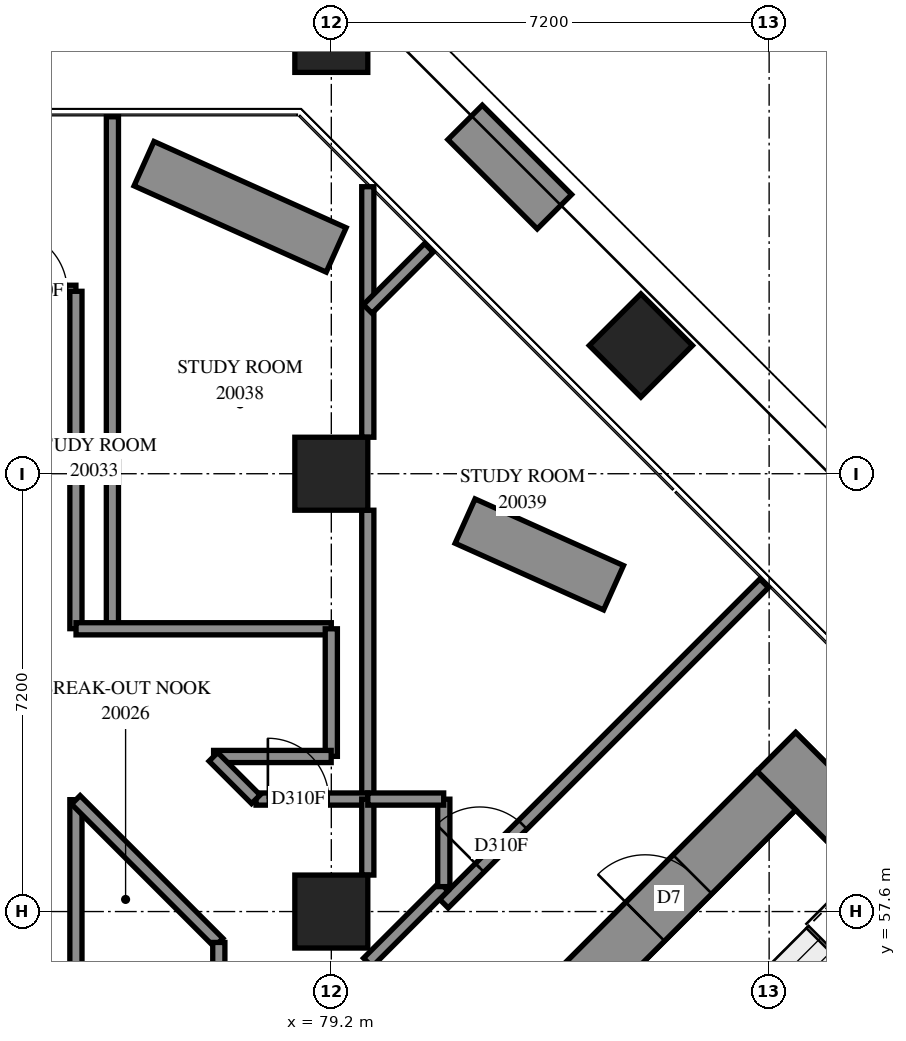
"""IFC4 building model, lengths in metres.
Left out: names, types, materials, properties, quantities, classifications, styles, units other than length and angle.
Written with IfcOpenShell. Run it as: python <this file> out.ifc"""

import sys

from ifc_helpers import new_model, si_unit, direction, frame, frame_2d, origin, origin_2d, place, context, subcontext, project, spatial, rectangle, extrude, element, fill, save


model = new_model("IFC4")
c1 = context("Model", 3, precision=1e-05, world=origin(), true_north=direction((0.0, 1.0)))
c2 = subcontext(c1, "Body", "Model", "MODEL_VIEW")
j1 = project(units=[si_unit("LENGTHUNIT", "METRE"), si_unit("PLANEANGLEUNIT", "RADIAN")], contexts=[c1])
p1 = place(None, origin())
s1 = spatial("IfcSite", under=j1, at=p1, CompositionType="ELEMENT")
p2 = place(p1, origin())
s2 = spatial("IfcBuilding", under=s1, at=p2, CompositionType="ELEMENT")
p3 = place(p2, frame((0.0, 0.0, 77.0)))
s3 = spatial("IfcBuildingStorey", under=s2, at=p3, CompositionType="ELEMENT", Elevation=77.0)
for number, where, z_axis, x_axis in (
    (1, (79.2, 57.6, 0.0), (0.0, 0.0, 1.0), (1.0, 0.0, 0.0)),
    (2, (79.2, 64.8, 0.0), (0.0, 0.0, 1.0), (1.0, 0.0, 0.0)),
    (3, (79.2, 72.0, 0.0), (0.0, 0.0, 1.0), (1.0, 0.0, 0.0)),
    (4, (84.291, 66.909, 0.0), (0.0, 0.0, 1.0), (0.707, -0.707, 0.0)),
):
    element("IfcColumn", number, at=place(p3, frame(where, z_axis=z_axis, x_axis=x_axis)), inside=s3, PredefinedType="COLUMN", context=c2, shape_type="SweptSolid", body=[
        extrude(rectangle(XDim=1.2, YDim=1.2, at=origin_2d()), origin(), (0.0, 0.0, 1.0), 3.9),
    ])
p4 = place(p3, frame((86.519, 60.227, -0.3), z_axis=(0.0, 0.0, 1.0), x_axis=(0.7071036948, -0.7071098676, 0.0)))
e5 = element("IfcWall", 5, at=p4, inside=s3, PredefinedType="SHEAR", context=c2, shape_type="SweptSolid", body=[
    extrude(rectangle(XDim=16.2, YDim=0.9, at=frame_2d((8.1, 0.0))), origin(), (0.0, 0.0, 1.0), 3.5),
])
p5 = place(p4, frame((10.9, 0.0, 0.3)))
e6 = element("IfcOpeningElement", 6, at=p5, cuts=e5, PredefinedType="OPENING", context=c2, shape_type="SweptSolid", body=[
    extrude(rectangle(XDim=0.8, YDim=2.1, at=frame_2d((0.4, 1.05))), frame((0.0, 0.46, 0.0), z_axis=(0.0, -1.0, 0.0), x_axis=(1.0, 0.0, 0.0)), (0.0, 0.0, 1.0), 0.92),
])
p6 = place(p3, frame((76.336, 49.408, -0.3), z_axis=(0.0, 0.0, 1.0), x_axis=(0.7071067812, 0.7071067812, 0.0)))
e7 = element("IfcWall", 7, at=p6, inside=s3, PredefinedType="SHEAR", context=c2, shape_type="SweptSolid", body=[
    extrude(rectangle(XDim=14.4, YDim=0.9, at=frame_2d((7.2, 0.0))), origin(), (0.0, 0.0, 1.0), 3.5),
])
p7 = place(p6, frame((4.55, 0.0, 0.3)))
e8 = element("IfcOpeningElement", 8, at=p7, cuts=e7, PredefinedType="OPENING", context=c2, shape_type="SweptSolid", body=[
    extrude(rectangle(XDim=1.1, YDim=2.1, at=frame_2d((0.55, 1.05))), frame((0.0, 0.46, 0.0), z_axis=(0.0, -1.0, 0.0), x_axis=(1.0, 0.0, 0.0)), (0.0, 0.0, 1.0), 0.92),
])
p8 = place(p6, frame((11.35, 0.0, 0.3)))
e9 = element("IfcOpeningElement", 9, at=p8, cuts=e7, PredefinedType="OPENING", context=c2, shape_type="SweptSolid", body=[
    extrude(rectangle(XDim=1.1, YDim=2.1, at=frame_2d((0.55, 1.05))), frame((0.0, 0.46, 0.0), z_axis=(0.0, -1.0, 0.0), x_axis=(1.0, 0.0, 0.0)), (0.0, 0.0, 1.0), 0.92),
])
p9 = place(p3, frame((82.869, 69.109, 0.0), z_axis=(0.0, 0.0, 1.0), x_axis=(-0.7071067812, 0.7071067812, 0.0)))
e10 = element("IfcWall", 10, at=p9, inside=s3, PredefinedType="SOLIDWALL", context=c2, shape_type="SweptSolid", body=[
    extrude(rectangle(XDim=2.078, YDim=0.8, at=frame_2d((1.039, 0.0))), origin(), (0.0, 0.0, 1.0), 0.65),
])
p10 = place(p3, frame((79.28, 68.48, 0.0), z_axis=(0.0, 0.0, 1.0), x_axis=(-0.9122884657, 0.4095482333, 0.0)))
e11 = element("IfcWall", 11, at=p10, inside=s3, PredefinedType="SOLIDWALL", context=c2, shape_type="SweptSolid", body=[
    extrude(rectangle(XDim=3.464, YDim=0.8, at=frame_2d((1.732, 0.0))), origin(), (0.0, 0.0, 1.0), 0.65),
])
p11 = place(p3, frame((83.841, 62.925, 0.0), z_axis=(0.0, 0.0, 1.0), x_axis=(-0.9122966033, 0.4095301059, 0.0)))
e12 = element("IfcWall", 12, at=p11, inside=s3, PredefinedType="SOLIDWALL", context=c2, shape_type="SweptSolid", body=[
    extrude(rectangle(XDim=2.676, YDim=0.8, at=frame_2d((1.338, 0.0))), origin(), (0.0, 0.0, 1.0), 0.65),
])
p12 = place(p3, frame((54.6, 67.8, 0.0), z_axis=(0.0, 0.0, 1.0), x_axis=(1.0, 0.0, 0.0)))
e13 = element("IfcWall", 13, at=p12, inside=s3, PredefinedType="PARTITIONING", context=c2, shape_type="SweptSolid", body=[
    extrude(rectangle(XDim=20.4, YDim=0.2, at=frame_2d((10.2, 0.0))), origin(), (0.0, 0.0, 1.0), 3.9),
])
p13 = place(p12, frame((19.257, 0.0, 0.0)))
e14 = element("IfcOpeningElement", 14, at=p13, cuts=e13, PredefinedType="OPENING", context=c2, shape_type="SweptSolid", body=[
    extrude(rectangle(XDim=1.0, YDim=2.1, at=frame_2d((0.5, 1.05))), frame((0.0, 0.11, 0.0), z_axis=(0.0, -1.0, 0.0), x_axis=(1.0, 0.0, 0.0)), (0.0, 0.0, 1.0), 0.22),
])
p14 = place(p12, frame((5.093, 0.0, 0.0)))
e15 = element("IfcOpeningElement", 15, at=p14, cuts=e13, PredefinedType="OPENING", context=c2, shape_type="SweptSolid", body=[
    extrude(rectangle(XDim=1.0, YDim=2.1, at=frame_2d((0.5, 1.05))), frame((0.0, 0.11, 0.0), z_axis=(0.0, -1.0, 0.0), x_axis=(1.0, 0.0, 0.0)), (0.0, 0.0, 1.0), 0.22),
])
p15 = place(p12, frame((7.168, 0.0, 0.0)))
e16 = element("IfcOpeningElement", 16, at=p15, cuts=e13, PredefinedType="OPENING", context=c2, shape_type="SweptSolid", body=[
    extrude(rectangle(XDim=1.0, YDim=2.1, at=frame_2d((0.5, 1.05))), frame((0.0, 0.11, 0.0), z_axis=(0.0, -1.0, 0.0), x_axis=(1.0, 0.0, 0.0)), (0.0, 0.0, 1.0), 0.22),
])
p16 = place(p12, frame((12.293, 0.0, 0.0)))
e17 = element("IfcOpeningElement", 17, at=p16, cuts=e13, PredefinedType="OPENING", context=c2, shape_type="SweptSolid", body=[
    extrude(rectangle(XDim=1.0, YDim=2.1, at=frame_2d((0.5, 1.05))), frame((0.0, 0.11, 0.0), z_axis=(0.0, -1.0, 0.0), x_axis=(1.0, 0.0, 0.0)), (0.0, 0.0, 1.0), 0.22),
])
p17 = place(p12, frame((14.367, 0.0, 0.0)))
e18 = element("IfcOpeningElement", 18, at=p17, cuts=e13, PredefinedType="OPENING", context=c2, shape_type="SweptSolid", body=[
    extrude(rectangle(XDim=1.0, YDim=2.1, at=frame_2d((0.5, 1.05))), frame((0.0, 0.11, 0.0), z_axis=(0.0, -1.0, 0.0), x_axis=(1.0, 0.0, 0.0)), (0.0, 0.0, 1.0), 0.22),
])
p18 = place(p3, frame((75.6, 62.25, 0.0), z_axis=(0.0, 0.0, 1.0), x_axis=(0.0, 1.0, 0.0)))
e19 = element("IfcWall", 19, at=p18, inside=s3, PredefinedType="PARTITIONING", context=c2, shape_type="SweptSolid", body=[
    extrude(rectangle(XDim=8.42, YDim=0.2, at=frame_2d((4.21, 0.0))), origin(), (0.0, 0.0, 1.0), 3.9),
])
p19 = place(p3, frame((81.051, 57.731, 0.0), z_axis=(0.0, 0.0, 1.0), x_axis=(0.7071067812, 0.7071067812, 0.0)))
e20 = element("IfcWall", 20, at=p19, inside=s3, PredefinedType="PARTITIONING", context=c2, shape_type="SweptSolid", body=[
    extrude(rectangle(XDim=7.45, YDim=0.2, at=frame_2d((3.725, 0.0))), origin(), (0.0, 0.0, 1.0), 3.9),
])
p20 = place(p19, frame((0.833, 0.0, 0.0)))
e21 = element("IfcOpeningElement", 21, at=p20, cuts=e20, PredefinedType="OPENING", context=c2, shape_type="SweptSolid", body=[
    extrude(rectangle(XDim=1.0, YDim=2.1, at=frame_2d((0.5, 1.05))), frame((0.0, 0.11, 0.0), z_axis=(0.0, -1.0, 0.0), x_axis=(1.0, 0.0, 0.0)), (0.0, 0.0, 1.0), 0.22),
])
p21 = place(p3, frame((75.0, 62.252, 0.0), z_axis=(0.0, 0.0, 1.0), x_axis=(0.0, 1.0, 0.0)))
e22 = element("IfcWall", 22, at=p21, inside=s3, PredefinedType="PARTITIONING", context=c2, shape_type="SweptSolid", body=[
    extrude(rectangle(XDim=5.548, YDim=0.2, at=frame_2d((2.774, 0.0))), origin(), (0.0, 0.0, 1.0), 3.9),
])
p22 = place(p3, frame((79.8, 59.45, 0.0), z_axis=(0.0, 0.0, 1.0), x_axis=(0.0, 1.0, 0.0)))
e23 = element("IfcWall", 23, at=p22, inside=s3, PredefinedType="PARTITIONING", context=c2, shape_type="SweptSolid", body=[
    extrude(rectangle(XDim=4.75, YDim=0.2, at=frame_2d((2.375, 0.0))), origin(), (0.0, 0.0, 1.0), 3.9),
])
p23 = place(p3, frame((75.0, 55.052, 0.0), z_axis=(0.0, 0.0, 1.0), x_axis=(0.0, 1.0, 0.0)))
e24 = element("IfcWall", 24, at=p23, inside=s3, PredefinedType="PARTITIONING", context=c2, shape_type="SweptSolid", body=[
    extrude(rectangle(XDim=4.388, YDim=0.2, at=frame_2d((2.194, 0.0))), origin(), (0.0, 0.0, 1.0), 3.9),
])
p24 = place(p3, frame((75.002, 62.25, 0.0), z_axis=(0.0, 0.0, 1.0), x_axis=(1.0, 0.0, 0.0)))
e25 = element("IfcWall", 25, at=p24, inside=s3, PredefinedType="PARTITIONING", context=c2, shape_type="SweptSolid", body=[
    extrude(rectangle(XDim=4.198, YDim=0.2, at=frame_2d((2.099, 0.0))), origin(), (0.0, 0.0, 1.0), 3.9),
])
p25 = place(p3, frame((79.8, 65.4, 0.0), z_axis=(0.0, 0.0, 1.0), x_axis=(0.0, 1.0, 0.0)))
e26 = element("IfcWall", 26, at=p25, inside=s3, PredefinedType="PARTITIONING", context=c2, shape_type="SweptSolid", body=[
    extrude(rectangle(XDim=4.12, YDim=0.2, at=frame_2d((2.06, 0.0))), origin(), (0.0, 0.0, 1.0), 3.9),
])
p26 = place(p3, frame((74.999, 59.437, 0.0), z_axis=(0.0, 0.0, 1.0), x_axis=(0.7071067812, -0.7071067812, 0.0)))
e27 = element("IfcWall", 27, at=p26, inside=s3, PredefinedType="PARTITIONING", context=c2, shape_type="SweptSolid", body=[
    extrude(rectangle(XDim=3.321, YDim=0.2, at=frame_2d((1.66, 0.0))), origin(), (0.0, 0.0, 1.0), 3.9),
])
p27 = place(p3, frame((79.2, 60.152, 0.0), z_axis=(0.0, 0.0, 1.0), x_axis=(0.0, 1.0, 0.0)))
e28 = element("IfcWall", 28, at=p27, inside=s3, PredefinedType="PARTITIONING", context=c2, shape_type="SweptSolid", body=[
    extrude(rectangle(XDim=2.098, YDim=0.2, at=frame_2d((1.049, 0.0))), origin(), (0.0, 0.0, 1.0), 3.9),
])
p28 = place(p3, frame((77.264, 60.15, 0.0), z_axis=(0.0, 0.0, 1.0), x_axis=(1.0, 0.0, 0.0)))
e29 = element("IfcWall", 29, at=p28, inside=s3, PredefinedType="PARTITIONING", context=c2, shape_type="SweptSolid", body=[
    extrude(rectangle(XDim=1.934, YDim=0.2, at=frame_2d((0.967, 0.0))), origin(), (0.0, 0.0, 1.0), 3.9),
])
p29 = place(p3, frame((77.962, 59.45, 0.0), z_axis=(0.0, 0.0, 1.0), x_axis=(1.0, 0.0, 0.0)))
e30 = element("IfcWall", 30, at=p29, inside=s3, PredefinedType="PARTITIONING", context=c2, shape_type="SweptSolid", body=[
    extrude(rectangle(XDim=1.838, YDim=0.2, at=frame_2d((0.919, 0.0))), origin(), (0.0, 0.0, 1.0), 3.9),
])
p30 = place(p29, frame((0.195, 0.0, 0.0)))
e31 = element("IfcOpeningElement", 31, at=p30, cuts=e30, PredefinedType="OPENING", context=c2, shape_type="SweptSolid", body=[
    extrude(rectangle(XDim=1.0, YDim=2.1, at=frame_2d((0.5, 1.05))), frame((0.0, 0.11, 0.0), z_axis=(0.0, -1.0, 0.0), x_axis=(1.0, 0.0, 0.0)), (0.0, 0.0, 1.0), 0.22),
])
p31 = place(p3, frame((79.801, 56.763, 0.0), z_axis=(0.0, 0.0, 1.0), x_axis=(0.7071067812, 0.7071067812, 0.0)))
e32 = element("IfcWall", 32, at=p31, inside=s3, PredefinedType="PARTITIONING", context=c2, shape_type="SweptSolid", body=[
    extrude(rectangle(XDim=1.765, YDim=0.2, at=frame_2d((0.882, 0.0))), origin(), (0.0, 0.0, 1.0), 3.9),
])
p32 = place(p3, frame((81.05, 58.01, 0.0), z_axis=(0.0, 0.0, 1.0), x_axis=(0.0, 1.0, 0.0)))
e33 = element("IfcWall", 33, at=p32, inside=s3, PredefinedType="PARTITIONING", context=c2, shape_type="SweptSolid", body=[
    extrude(rectangle(XDim=1.438, YDim=0.2, at=frame_2d((0.719, 0.0))), origin(), (0.0, 0.0, 1.0), 3.9),
])
p33 = place(p3, frame((79.799, 67.509, 0.0), z_axis=(0.0, 0.0, 1.0), x_axis=(0.7071067812, 0.7071067812, 0.0)))
e34 = element("IfcWall", 34, at=p33, inside=s3, PredefinedType="PARTITIONING", context=c2, shape_type="SweptSolid", body=[
    extrude(rectangle(XDim=1.423, YDim=0.2, at=frame_2d((0.711, 0.0))), origin(), (0.0, 0.0, 1.0), 3.9),
])
p34 = place(p3, frame((77.35, 55.752, 0.0), z_axis=(0.0, 0.0, 1.0), x_axis=(0.0, 1.0, 0.0)))
e35 = element("IfcWall", 35, at=p34, inside=s3, PredefinedType="PARTITIONING", context=c2, shape_type="SweptSolid", body=[
    extrude(rectangle(XDim=1.34, YDim=0.2, at=frame_2d((0.67, 0.0))), origin(), (0.0, 0.0, 1.0), 3.9),
])
p35 = place(p3, frame((79.8, 58.2, 0.0), z_axis=(0.0, 0.0, 1.0), x_axis=(0.0, 1.0, 0.0)))
e36 = element("IfcWall", 36, at=p35, inside=s3, PredefinedType="PARTITIONING", context=c2, shape_type="SweptSolid", body=[
    extrude(rectangle(XDim=1.25, YDim=0.2, at=frame_2d((0.625, 0.0))), origin(), (0.0, 0.0, 1.0), 3.9),
])
p36 = place(p3, frame((79.8, 59.45, 0.0), z_axis=(0.0, 0.0, 1.0), x_axis=(1.0, 0.0, 0.0)))
e37 = element("IfcWall", 37, at=p36, inside=s3, PredefinedType="PARTITIONING", context=c2, shape_type="SweptSolid", body=[
    extrude(rectangle(XDim=1.248, YDim=0.2, at=frame_2d((0.624, 0.0))), origin(), (0.0, 0.0, 1.0), 3.9),
])
p37 = place(p3, frame((77.26, 60.145, 0.0), z_axis=(0.0, 0.0, 1.0), x_axis=(0.7071067812, -0.7071067812, 0.0)))
e38 = element("IfcWall", 38, at=p37, inside=s3, PredefinedType="PARTITIONING", context=c2, shape_type="SweptSolid", body=[
    extrude(rectangle(XDim=0.987, YDim=0.2, at=frame_2d((0.493, 0.0))), origin(), (0.0, 0.0, 1.0), 3.9),
])
p38 = place(p8, origin())
e39 = element("IfcDoor", 39, at=p38, inside=s3, OperationType="SINGLE_SWING_LEFT", PredefinedType="DOOR", context=c2, shape_type="SweptSolid", body=[
    extrude(rectangle(XDim=1.1, YDim=2.1, at=frame_2d((0.55, 1.05))), frame((0.0, 0.025, 0.0), z_axis=(0.0, -1.0, 0.0), x_axis=(1.0, 0.0, 0.0)), (0.0, 0.0, 1.0), 0.05),
])
fill(e9, e39)
p39 = place(p13, origin())
e40 = element("IfcDoor", 40, at=p39, inside=s3, OperationType="SINGLE_SWING_RIGHT", PredefinedType="DOOR", context=c2, shape_type="SweptSolid", body=[
    extrude(rectangle(XDim=1.0, YDim=2.1, at=frame_2d((0.5, 1.05))), frame((0.0, 0.025, 0.0), z_axis=(0.0, -1.0, 0.0), x_axis=(1.0, 0.0, 0.0)), (0.0, 0.0, 1.0), 0.05),
])
fill(e14, e40)
p40 = place(p30, origin())
e41 = element("IfcDoor", 41, at=p40, inside=s3, OperationType="SINGLE_SWING_LEFT", PredefinedType="DOOR", context=c2, shape_type="SweptSolid", body=[
    extrude(rectangle(XDim=1.0, YDim=2.1, at=frame_2d((0.5, 1.05))), frame((0.0, 0.025, 0.0), z_axis=(0.0, -1.0, 0.0), x_axis=(1.0, 0.0, 0.0)), (0.0, 0.0, 1.0), 0.05),
])
fill(e31, e41)
p41 = place(p20, origin())
e42 = element("IfcDoor", 42, at=p41, inside=s3, OperationType="SINGLE_SWING_RIGHT", PredefinedType="DOOR", context=c2, shape_type="SweptSolid", body=[
    extrude(rectangle(XDim=1.0, YDim=2.1, at=frame_2d((0.5, 1.05))), frame((0.0, 0.025, 0.0), z_axis=(0.0, -1.0, 0.0), x_axis=(1.0, 0.0, 0.0)), (0.0, 0.0, 1.0), 0.05),
])
fill(e21, e42)
save(model, sys.argv[1])
